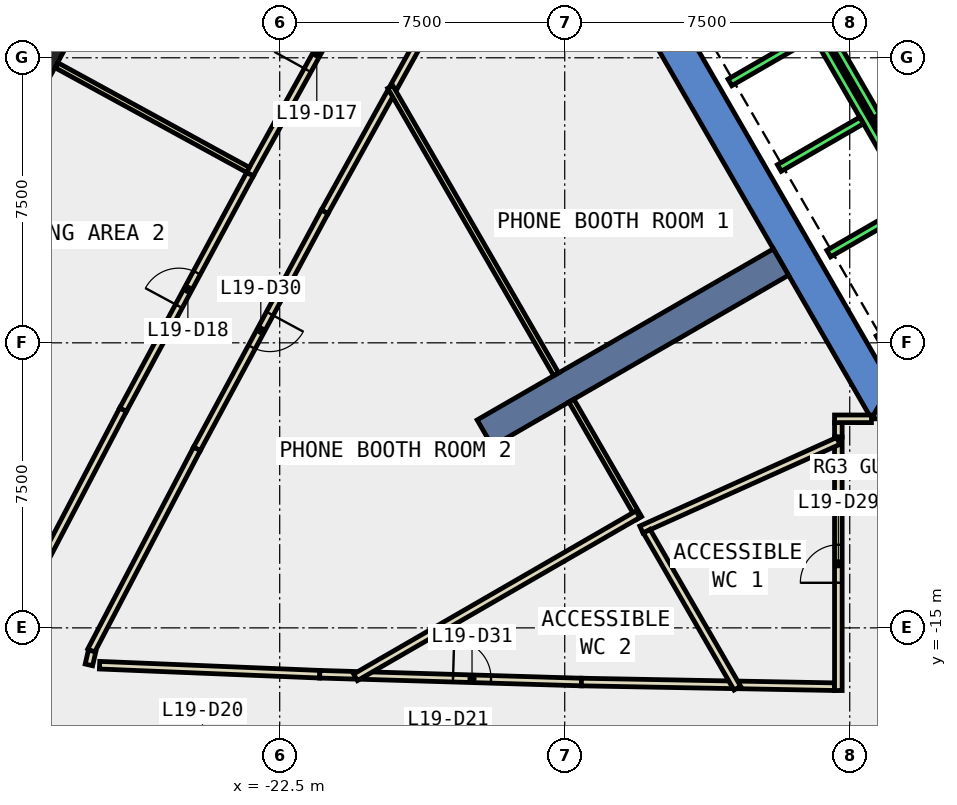
"""IFC4 building model, lengths in metres.
Left out: names, types, materials, properties, quantities, classifications, styles, units other than length and angle.
Written with IfcOpenShell. Run it as: python <this file> out.ifc"""

import sys

from ifc_helpers import new_model, si_unit, direction, frame, frame_2d, origin, origin_2d, place, context, subcontext, project, spatial, polyline, rectangle, outline, extrude, element, fill, save


model = new_model("IFC4")
c1 = context("Model", 3, precision=1e-05, world=origin(), true_north=direction((0.0, 1.0)))
c2 = subcontext(c1, "Body", "Model", "MODEL_VIEW")
j1 = project(units=[si_unit("LENGTHUNIT", "METRE"), si_unit("PLANEANGLEUNIT", "RADIAN")], contexts=[c1])
p1 = place(None, origin())
s1 = spatial("IfcSite", under=j1, at=p1, CompositionType="ELEMENT")
p2 = place(p1, origin())
s2 = spatial("IfcBuilding", under=s1, at=p2, CompositionType="ELEMENT")
p3 = place(p2, frame((0.0, 0.0, 90.8)))
s3 = spatial("IfcBuildingStorey", under=s2, at=p3, CompositionType="ELEMENT", Elevation=90.8)
p4 = place(p3, frame((-29.039, 0.167, -0.4), z_axis=(0.0, 0.0, 1.0), x_axis=(0.479611016922, 0.87748120917, 0.0)))
e1 = element("IfcColumn", 1, at=p4, inside=s3, PredefinedType="COLUMN", context=c2, shape_type="SweptSolid", body=[
    extrude(rectangle(XDim=1.1, YDim=1.5, at=origin_2d()), origin(), (0.0, 0.0, 1.0), 4.2),
])
p5 = place(p3, frame((0.0, 0.0, -0.4)))
e2 = element("IfcWall", 2, at=p5, inside=s3, PredefinedType="SHEAR", context=c2, shape_type="SweptSolid", body=[
    extrude(outline(polyline([(-13.856, 2.5), (-6.928, -9.5), (-6.409, -8.6), (-12.817, 2.5), (-13.856, 2.5)])), origin(), (0.0, 0.0, 1.0), 4.2),
])
p6 = place(p3, frame((0.0, 0.0, -0.4)))
e3 = element("IfcWall", 3, at=p6, inside=s3, PredefinedType="SHEAR", context=c2, shape_type="SweptSolid", body=[
    extrude(outline(polyline([(3.75, -9.5), (3.75, -8.6), (-6.409, -8.6), (-6.928, -9.5), (3.75, -9.5)])), origin(), (0.0, 0.0, 1.0), 4.2),
])
p7 = place(p3, frame((-9.31, -5.375, -0.4), z_axis=(0.0, 0.0, 1.0), x_axis=(-0.866017533419, -0.500013631625, 0.0)))
e4 = element("IfcWall", 4, at=p7, inside=s3, PredefinedType="SHEAR", context=c2, shape_type="SweptSolid", body=[
    extrude(rectangle(XDim=9.0, YDim=0.8, at=frame_2d((4.5, 0.0))), origin(), (0.0, 0.0, 1.0), 4.2),
])
p8 = place(p3, frame((-17.883, 2.143, 0.0), z_axis=(0.0, 0.0, 1.0), x_axis=(-0.484695523805, -0.874682942101, 0.0)))
e5 = element("IfcWall", 5, at=p8, inside=s3, PredefinedType="PARTITIONING", context=c2, shape_type="SweptSolid", body=[
    extrude(rectangle(XDim=3.349, YDim=0.2, at=frame_2d((1.674, 0.0))), origin(), (0.0, 0.0, 1.0), 3.8),
])
p9 = place(p3, frame((-10.408, -16.501, 0.0), z_axis=(0.0, 0.0, 1.0), x_axis=(0.999823568917, -0.018783797216, 0.0)))
e6 = element("IfcWall", 6, at=p9, inside=s3, PredefinedType="PARTITIONING", context=c2, shape_type="SweptSolid", body=[
    extrude(rectangle(XDim=2.509, YDim=0.2, at=frame_2d((1.254, 0.0))), origin(), (0.0, 0.0, 1.0), 3.8),
])
p10 = place(p3, frame((-19.579, -0.917, 0.0), z_axis=(0.0, 0.0, 1.0), x_axis=(-0.484700239797, -0.874680328772, 0.0)))
e7 = element("IfcWall", 7, at=p10, inside=s3, PredefinedType="PARTITIONING", context=c2, shape_type="SweptSolid", body=[
    extrude(rectangle(XDim=3.585, YDim=0.2, at=frame_2d((1.792, 0.0))), origin(), (0.0, 0.0, 1.0), 3.8),
])
p11 = place(p3, frame((-21.317, -4.053, 0.0), z_axis=(0.0, 0.0, 1.0), x_axis=(-0.474391588657, -0.880313932987, 0.0)))
e8 = element("IfcWall", 8, at=p11, inside=s3, PredefinedType="PARTITIONING", context=c2, shape_type="SweptSolid", body=[
    extrude(rectangle(XDim=7.085, YDim=0.2, at=frame_2d((3.542, 0.0))), origin(), (0.0, 0.0, 1.0), 3.8),
])
p12 = place(p11, frame((3.042, 0.0, 0.0)))
e9 = element("IfcOpeningElement", 9, at=p12, cuts=e8, PredefinedType="OPENING", context=c2, shape_type="SweptSolid", body=[
    extrude(rectangle(XDim=1.0, YDim=2.1, at=frame_2d((0.5, 1.05))), frame((0.0, 0.11, 0.0), z_axis=(0.0, -1.0, 0.0), x_axis=(1.0, 0.0, 0.0)), (0.0, 0.0, 1.0), 0.22),
])
p13 = place(p3, frame((-24.678, -10.29, 0.0), z_axis=(0.0, 0.0, 1.0), x_axis=(-0.464203280494, -0.885728691179, 0.0)))
e10 = element("IfcWall", 10, at=p13, inside=s3, PredefinedType="PARTITIONING", context=c2, shape_type="SweptSolid", body=[
    extrude(rectangle(XDim=5.995, YDim=0.2, at=frame_2d((2.998, 0.0))), origin(), (0.0, 0.0, 1.0), 3.8),
])
p14 = place(p3, frame((-27.437, -15.609, 0.0), z_axis=(0.0, 0.0, 1.0), x_axis=(-0.224098195188, -0.97456656977, 0.0)))
e11 = element("IfcWall", 11, at=p14, inside=s3, PredefinedType="PARTITIONING", context=c2, shape_type="SweptSolid", body=[
    extrude(rectangle(XDim=0.375, YDim=0.2, at=frame_2d((0.188, 0.0))), origin(), (0.0, 0.0, 1.0), 3.8),
])
p15 = place(p3, frame((-27.24, -15.982, 0.0), z_axis=(0.0, 0.0, 1.0), x_axis=(0.999157128819, -0.041049140426, 0.0)))
e12 = element("IfcWall", 12, at=p15, inside=s3, PredefinedType="PARTITIONING", context=c2, shape_type="SweptSolid", body=[
    extrude(rectangle(XDim=5.799, YDim=0.2, at=frame_2d((2.899, 0.0))), origin(), (0.0, 0.0, 1.0), 3.8),
])
p16 = place(p3, frame((-21.446, -16.22, 0.0), z_axis=(0.0, 0.0, 1.0), x_axis=(0.999542625536, -0.030241358047, 0.0)))
e13 = element("IfcWall", 13, at=p16, inside=s3, PredefinedType="PARTITIONING", context=c2, shape_type="SweptSolid", body=[
    extrude(rectangle(XDim=0.928, YDim=0.2, at=frame_2d((0.464, 0.0))), origin(), (0.0, 0.0, 1.0), 3.8),
])
p17 = place(p3, frame((-20.318, -16.253, 0.0), z_axis=(0.0, 0.0, 1.0), x_axis=(0.999553385537, -0.029883598524, 0.0)))
e14 = element("IfcWall", 14, at=p17, inside=s3, PredefinedType="PARTITIONING", context=c2, shape_type="SweptSolid", body=[
    extrude(rectangle(XDim=5.76, YDim=0.2, at=frame_2d((2.88, 0.0))), origin(), (0.0, 0.0, 1.0), 3.8),
])
p18 = place(p17, frame((2.38, 0.0, 0.0)))
e15 = element("IfcOpeningElement", 15, at=p18, cuts=e14, PredefinedType="OPENING", context=c2, shape_type="SweptSolid", body=[
    extrude(rectangle(XDim=1.0, YDim=2.1, at=frame_2d((0.5, 1.05))), frame((0.0, 0.11, 0.0), z_axis=(0.0, -1.0, 0.0), x_axis=(1.0, 0.0, 0.0)), (0.0, 0.0, 1.0), 0.22),
])
p19 = place(p3, frame((-14.561, -16.425, 0.0), z_axis=(0.0, 0.0, 1.0), x_axis=(0.999829548691, -0.018462761553, 0.0)))
e16 = element("IfcWall", 16, at=p19, inside=s3, PredefinedType="PARTITIONING", context=c2, shape_type="SweptSolid", body=[
    extrude(rectangle(XDim=3.954, YDim=0.2, at=frame_2d((1.977, 0.0))), origin(), (0.0, 0.0, 1.0), 3.8),
])
p20 = place(p3, frame((-23.284, -3.064, 0.0), z_axis=(0.0, 0.0, 1.0), x_axis=(0.48478560119, 0.874633020689, 0.0)))
e17 = element("IfcWall", 17, at=p20, inside=s3, PredefinedType="PARTITIONING", context=c2, shape_type="SweptSolid", body=[
    extrude(rectangle(XDim=7.11, YDim=0.2, at=frame_2d((3.555, 0.0))), origin(), (0.0, 0.0, 1.0), 3.8),
])
p21 = place(p20, frame((3.13, 0.0, 0.0)))
e18 = element("IfcOpeningElement", 18, at=p21, cuts=e17, PredefinedType="OPENING", context=c2, shape_type="SweptSolid", body=[
    extrude(rectangle(XDim=1.0, YDim=2.1, at=frame_2d((0.5, 1.05))), frame((0.0, 0.11, 0.0), z_axis=(0.0, -1.0, 0.0), x_axis=(1.0, 0.0, 0.0)), (0.0, 0.0, 1.0), 0.22),
])
p22 = place(p3, frame((-29.541, -14.829, 0.0), z_axis=(0.0, 0.0, 1.0), x_axis=(0.46422598759, 0.885716790202, 0.0)))
e19 = element("IfcWall", 19, at=p22, inside=s3, PredefinedType="PARTITIONING", context=c2, shape_type="SweptSolid", body=[
    extrude(rectangle(XDim=6.29, YDim=0.2, at=frame_2d((3.145, 0.0))), origin(), (0.0, 0.0, 1.0), 3.8),
])
p23 = place(p3, frame((-26.621, -9.258, 0.0), z_axis=(0.0, 0.0, 1.0), x_axis=(0.474414295505, 0.880301696136, 0.0)))
e20 = element("IfcWall", 20, at=p23, inside=s3, PredefinedType="PARTITIONING", context=c2, shape_type="SweptSolid", body=[
    extrude(rectangle(XDim=7.036, YDim=0.2, at=frame_2d((3.518, 0.0))), origin(), (0.0, 0.0, 1.0), 3.8),
])
p24 = place(p23, frame((3.093, 0.0, 0.0)))
e21 = element("IfcOpeningElement", 21, at=p24, cuts=e20, PredefinedType="OPENING", context=c2, shape_type="SweptSolid", body=[
    extrude(rectangle(XDim=1.0, YDim=2.1, at=frame_2d((0.5, 1.05))), frame((0.0, 0.11, 0.0), z_axis=(0.0, -1.0, 0.0), x_axis=(1.0, 0.0, 0.0)), (0.0, 0.0, 1.0), 0.22),
])
p25 = place(p3, frame((-27.608, -18.144, 0.0), z_axis=(0.0, 0.0, 1.0), x_axis=(-0.956137025409, 0.292919764852, 0.0)))
e22 = element("IfcWall", 22, at=p25, inside=s3, PredefinedType="PARTITIONING", context=c2, shape_type="SweptSolid", body=[
    extrude(rectangle(XDim=1.707, YDim=0.2, at=frame_2d((0.854, 0.0))), origin(), (0.0, 0.0, 1.0), 3.8),
])
p26 = place(p3, frame((-5.492, -3.788, 0.0), z_axis=(0.0, 0.0, 1.0), x_axis=(-0.500008949224, 0.866020236886, 0.0)))
e23 = element("IfcWall", 23, at=p26, inside=s3, PredefinedType="PARTITIONING", context=c2, shape_type="SweptSolid", body=[
    extrude(rectangle(XDim=2.68, YDim=0.2, at=frame_2d((1.34, 0.0))), origin(), (0.0, 0.0, 1.0), 3.8),
])
p27 = place(p3, frame((-7.8, -9.98, 0.0), z_axis=(0.0, 0.0, 1.0), x_axis=(0.0, 1.0, 0.0)))
e24 = element("IfcWall", 24, at=p27, inside=s3, PredefinedType="PARTITIONING", context=c2, shape_type="SweptSolid", body=[
    extrude(rectangle(XDim=0.381, YDim=0.2, at=frame_2d((0.19, 0.0))), origin(), (0.0, 0.0, 1.0), 3.8),
])
p28 = place(p3, frame((-7.9, -9.499, 0.0), z_axis=(0.0, 0.0, 1.0), x_axis=(1.0, 0.0, 0.0)))
e25 = element("IfcWall", 25, at=p28, inside=s3, PredefinedType="PARTITIONING", context=c2, shape_type="SweptSolid", body=[
    extrude(rectangle(XDim=0.971, YDim=0.2, at=frame_2d((0.485, 0.0))), origin(), (0.0, 0.0, 1.0), 3.8),
])
p29 = place(p3, frame((-7.8, -16.649, 0.0), z_axis=(0.0, 0.0, 1.0), x_axis=(0.0, 1.0, 0.0)))
e26 = element("IfcWall", 26, at=p29, inside=s3, PredefinedType="PARTITIONING", context=c2, shape_type="SweptSolid", body=[
    extrude(rectangle(XDim=6.669, YDim=0.2, at=frame_2d((3.334, 0.0))), origin(), (0.0, 0.0, 1.0), 3.8),
])
p30 = place(p29, frame((2.835, 0.0, 0.0)))
e27 = element("IfcOpeningElement", 27, at=p30, cuts=e26, PredefinedType="OPENING", context=c2, shape_type="SweptSolid", body=[
    extrude(rectangle(XDim=1.0, YDim=2.1, at=frame_2d((0.5, 1.05))), frame((0.0, 0.11, 0.0), z_axis=(0.0, -1.0, 0.0), x_axis=(1.0, 0.0, 0.0)), (0.0, 0.0, 1.0), 0.22),
])
p31 = place(p3, frame((-7.8, -10.08, 0.0), z_axis=(0.0, 0.0, 1.0), x_axis=(-0.911938383636, -0.410327167577, 0.0)))
e28 = element("IfcWall", 28, at=p31, inside=s3, PredefinedType="PARTITIONING", context=c2, shape_type="SweptSolid", body=[
    extrude(rectangle(XDim=5.683, YDim=0.2, at=frame_2d((2.842, 0.0))), origin(), (0.0, 0.0, 1.0), 3.8),
])
p32 = place(p3, frame((-13.043, -12.108, 0.0), z_axis=(0.0, 0.0, 1.0), x_axis=(-0.499947764329, 0.866055559963, 0.0)))
e29 = element("IfcWall", 29, at=p32, inside=s3, PredefinedType="PARTITIONING", context=c2, shape_type="SweptSolid", body=[
    extrude(rectangle(XDim=3.564, YDim=0.15, at=frame_2d((1.782, 0.0))), origin(), (0.0, 0.0, 1.0), 3.8),
])
p33 = place(p3, frame((-10.458, -16.586, 0.0), z_axis=(0.0, 0.0, 1.0), x_axis=(-0.500121439648, 0.865955279218, 0.0)))
e30 = element("IfcWall", 30, at=p33, inside=s3, PredefinedType="PARTITIONING", context=c2, shape_type="SweptSolid", body=[
    extrude(rectangle(XDim=4.767, YDim=0.2, at=frame_2d((2.383, 0.0))), origin(), (0.0, 0.0, 1.0), 3.8),
])
p34 = place(p3, frame((-13.072, -12.009, 0.0), z_axis=(0.0, 0.0, 1.0), x_axis=(-0.865993734772, -0.500054848326, 0.0)))
e31 = element("IfcWall", 31, at=p34, inside=s3, PredefinedType="PARTITIONING", context=c2, shape_type="SweptSolid", body=[
    extrude(rectangle(XDim=8.583, YDim=0.2, at=frame_2d((4.292, 0.0))), origin(), (0.0, 0.0, 1.0), 3.8),
])
p35 = place(p3, frame((-23.336, -2.95, 0.0), z_axis=(0.0, 0.0, 1.0), x_axis=(-0.877455496162, 0.479658057637, 0.0)))
e32 = element("IfcWall", 32, at=p35, inside=s3, PredefinedType="PARTITIONING", context=c2, shape_type="SweptSolid", body=[
    extrude(rectangle(XDim=5.729, YDim=0.15, at=frame_2d((2.865, 0.0))), origin(), (0.0, 0.0, 1.0), 3.8),
])
p36 = place(p3, frame((-15.225, -8.328, 0.0), z_axis=(0.0, 0.0, 1.0), x_axis=(-0.500038648455, 0.866003088939, 0.0)))
e33 = element("IfcWall", 33, at=p36, inside=s3, PredefinedType="PARTITIONING", context=c2, shape_type="SweptSolid", body=[
    extrude(rectangle(XDim=8.733, YDim=0.15, at=frame_2d((4.367, 0.0))), origin(), (0.0, 0.0, 1.0), 3.8),
])
p37 = place(p3, frame((-8.192, 0.888, 0.0), z_axis=(0.0, 0.0, 1.0), x_axis=(0.49994636267, -0.866056369097, 0.0)))
e34 = element("IfcWall", 34, at=p37, inside=s3, PredefinedType="STANDARD", context=c2, shape_type="SweptSolid", body=[
    extrude(rectangle(XDim=2.8, YDim=0.2, at=frame_2d((1.4, 0.0))), origin(), (0.0, 0.0, 1.0), 3.8),
])
p38 = place(p3, frame((-4.677, -0.2, 0.0), z_axis=(0.0, 0.0, 1.0), x_axis=(-0.865973769406, -0.500089422704, 0.0)))
e35 = element("IfcWall", 35, at=p38, inside=s3, PredefinedType="STANDARD", context=c2, shape_type="SweptSolid", body=[
    extrude(rectangle(XDim=2.399, YDim=0.2, at=frame_2d((1.2, 0.0))), origin(), (0.0, 0.0, 1.0), 3.8),
])
p39 = place(p3, frame((-9.751, 2.99, 0.0), z_axis=(0.0, 0.0, 1.0), x_axis=(0.50000090737, -0.866024879913, 0.0)))
e36 = element("IfcWall", 36, at=p39, inside=s3, PredefinedType="STANDARD", context=c2, shape_type="SweptSolid", body=[
    extrude(rectangle(XDim=10.6, YDim=0.2, at=frame_2d((5.3, 0.0))), origin(), (0.0, 0.0, 1.0), 3.8),
])
for number, where, z_axis, x_axis in (
    (37, (-8.488, 0.602, 0.0), (0.0, 0.0, 1.0), (-0.866, -0.5, 0.0)),
    (38, (-7.188, -1.65, 0.0), (0.0, 0.0, 1.0), (-0.866, -0.5, 0.0)),
    (39, (-5.888, -3.902, 0.0), (0.0, 0.0, 1.0), (-0.866, -0.5, 0.0)),
    (40, (-4.588, -6.153, 0.0), (0.0, 0.0, 1.0), (-0.866, -0.5, 0.0)),
):
    element("IfcWall", number, at=place(p3, frame(where, z_axis=z_axis, x_axis=x_axis)), inside=s3, PredefinedType="STANDARD", context=c2, shape_type="SweptSolid", body=[
        extrude(rectangle(XDim=2.5, YDim=0.2, at=frame_2d((1.25, 0.0))), origin(), (0.0, 0.0, 1.0), 3.8),
    ])
p40 = place(p21, origin())
e41 = element("IfcDoor", 41, at=p40, inside=s3, OperationType="SINGLE_SWING_LEFT", PredefinedType="DOOR", context=c2, shape_type="SweptSolid", body=[
    extrude(rectangle(XDim=1.0, YDim=2.1, at=frame_2d((0.5, 1.05))), frame((0.0, 0.025, 0.0), z_axis=(0.0, -1.0, 0.0), x_axis=(1.0, 0.0, 0.0)), (0.0, 0.0, 1.0), 0.05),
])
fill(e18, e41)
p41 = place(p24, origin())
e42 = element("IfcDoor", 42, at=p41, inside=s3, OperationType="SINGLE_SWING_LEFT", PredefinedType="DOOR", context=c2, shape_type="SweptSolid", body=[
    extrude(rectangle(XDim=1.0, YDim=2.1, at=frame_2d((0.5, 1.05))), frame((0.0, 0.025, 0.0), z_axis=(0.0, -1.0, 0.0), x_axis=(1.0, 0.0, 0.0)), (0.0, 0.0, 1.0), 0.05),
])
fill(e21, e42)
p42 = place(p30, origin())
e43 = element("IfcDoor", 43, at=p42, inside=s3, OperationType="SINGLE_SWING_LEFT", PredefinedType="DOOR", context=c2, shape_type="SweptSolid", body=[
    extrude(rectangle(XDim=1.0, YDim=2.1, at=frame_2d((0.5, 1.05))), frame((0.0, 0.025, 0.0), z_axis=(0.0, -1.0, 0.0), x_axis=(1.0, 0.0, 0.0)), (0.0, 0.0, 1.0), 0.05),
])
fill(e27, e43)
p43 = place(p12, origin())
e44 = element("IfcDoor", 44, at=p43, inside=s3, OperationType="SINGLE_SWING_RIGHT", PredefinedType="DOOR", context=c2, shape_type="SweptSolid", body=[
    extrude(rectangle(XDim=1.0, YDim=2.1, at=frame_2d((0.5, 1.05))), frame((0.0, 0.025, 0.0), z_axis=(0.0, -1.0, 0.0), x_axis=(1.0, 0.0, 0.0)), (0.0, 0.0, 1.0), 0.05),
])
fill(e9, e44)
p44 = place(p18, origin())
e45 = element("IfcDoor", 45, at=p44, inside=s3, OperationType="SINGLE_SWING_LEFT", PredefinedType="DOOR", context=c2, shape_type="SweptSolid", body=[
    extrude(rectangle(XDim=1.0, YDim=2.1, at=frame_2d((0.5, 1.05))), frame((0.0, 0.025, 0.0), z_axis=(0.0, -1.0, 0.0), x_axis=(1.0, 0.0, 0.0)), (0.0, 0.0, 1.0), 0.05),
])
fill(e15, e45)
save(model, sys.argv[1])
